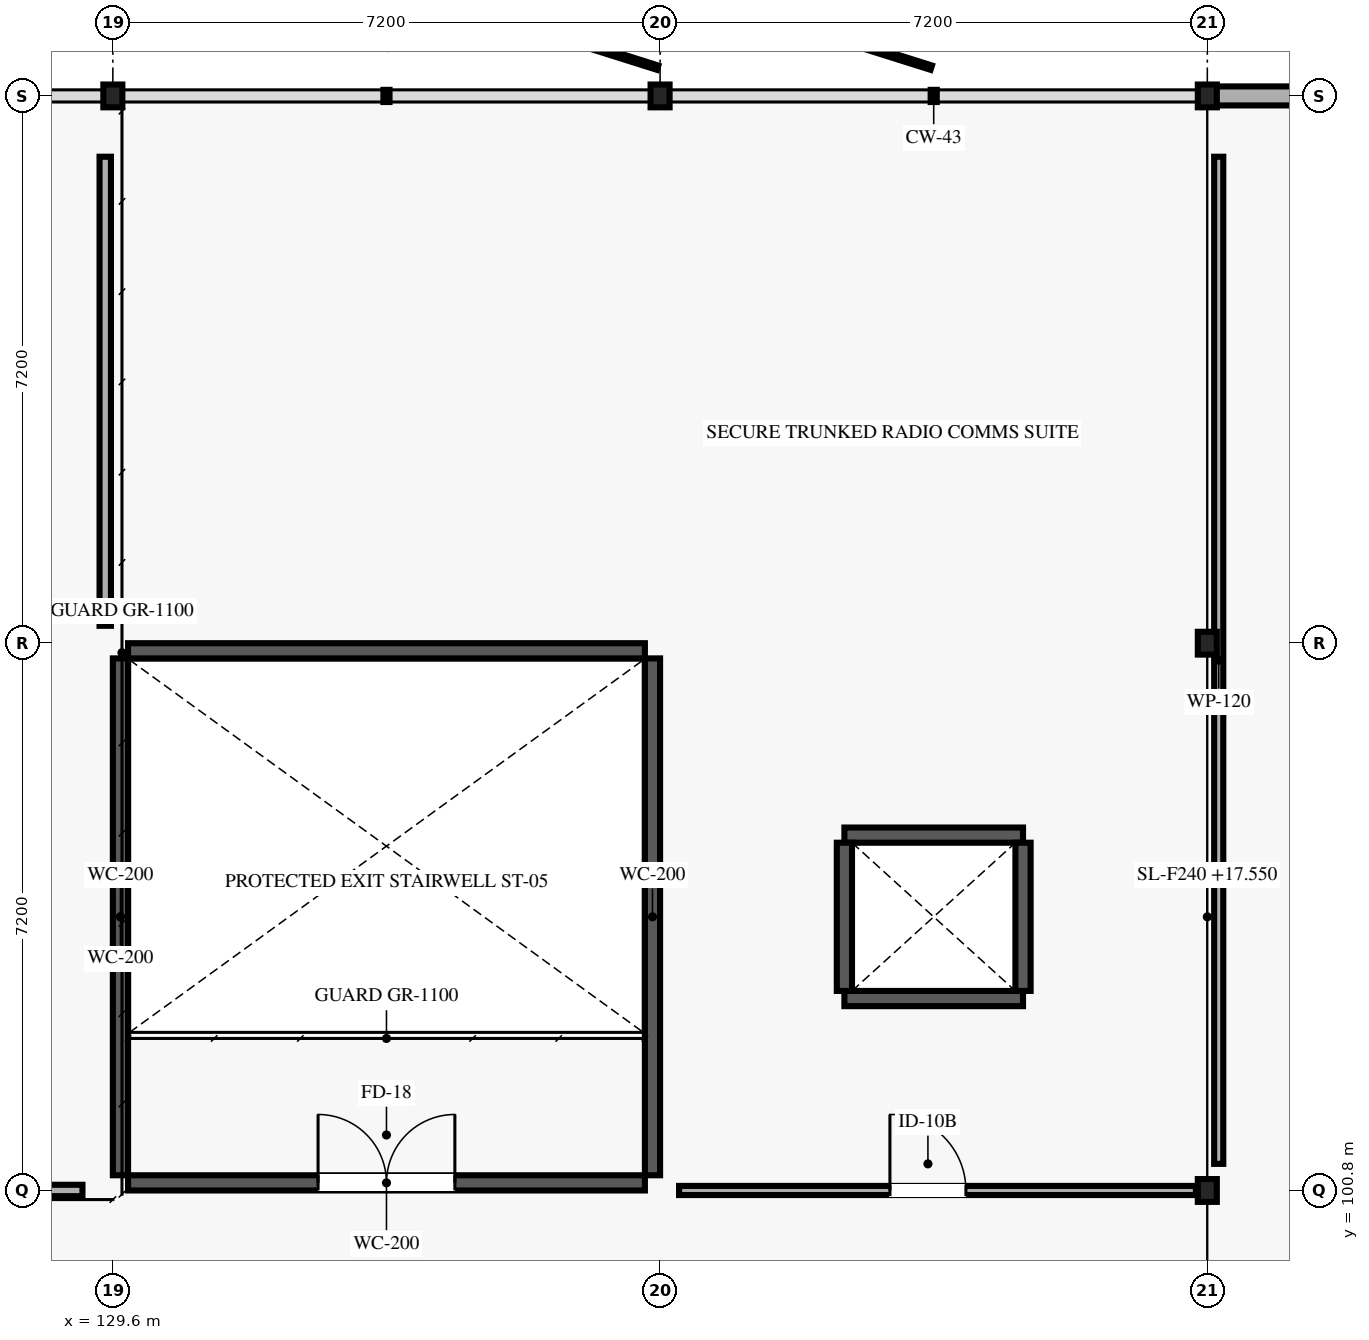
"""IFC4 building model, lengths in metres.
Left out: names, types, materials, properties, quantities, classifications, styles, units other than length and angle.
Written with IfcOpenShell. Run it as: python <this file> out.ifc"""

import sys

from ifc_helpers import new_model, si_unit, direction, frame, frame_2d, origin, origin_2d, place, context, subcontext, project, spatial, rectangle, i_section, extrude, element, fill, save


model = new_model("IFC4")
c1 = context("Model", 3, precision=1e-05, world=origin(), true_north=direction((0.0, 1.0)))
c2 = subcontext(c1, "Body", "Model", "MODEL_VIEW")
j1 = project(units=[si_unit("LENGTHUNIT", "METRE"), si_unit("PLANEANGLEUNIT", "RADIAN")], contexts=[c1])
p1 = place(None, origin())
s1 = spatial("IfcSite", under=j1, at=p1, CompositionType="ELEMENT")
p2 = place(p1, origin())
s2 = spatial("IfcBuilding", under=s1, at=p2, CompositionType="ELEMENT")
p3 = place(p2, frame((0.0, 0.0, 17.55)))
s3 = spatial("IfcBuildingStorey", under=s2, at=p3, CompositionType="ELEMENT", Elevation=17.55)
for number, where, z_axis, x_axis in (
    (1, (129.6, 115.2, 0.0), (0.0, 0.0, 1.0), (1.0, 0.0, 0.0)),
    (2, (136.8, 115.2, 0.0), (0.0, 0.0, 1.0), (1.0, 0.0, 0.0)),
    (3, (144.0, 100.8, 0.0), (0.0, 0.0, 1.0), (1.0, 0.0, 0.0)),
    (4, (144.0, 108.0, 0.0), (0.0, 0.0, 1.0), (1.0, 0.0, 0.0)),
    (5, (144.0, 115.2, 0.0), (0.0, 0.0, 1.0), (1.0, 0.0, 0.0)),
):
    element("IfcColumn", number, at=place(p3, frame(where, z_axis=z_axis, x_axis=x_axis)), inside=s3, PredefinedType="COLUMN", context=c2, shape_type="SweptSolid", body=[
        extrude(i_section(OverallWidth=0.25, OverallDepth=0.3, WebThickness=0.01, FlangeThickness=0.01, at=origin_2d()), origin(), (0.0, 0.0, 1.0), 4.05),
    ])
p4 = place(p3, frame((144.01, 115.2, 0.0), z_axis=(0.0, 0.0, 1.0), x_axis=(1.0, 0.0, 0.0)))
e6 = element("IfcWall", 6, at=p4, inside=s3, PredefinedType="SOLIDWALL", context=c2, shape_type="SweptSolid", body=[
    extrude(rectangle(XDim=6.895, YDim=0.25, at=frame_2d((3.448, 0.0))), origin(), (0.0, 0.0, 1.0), 3.295),
])
p5 = place(p4, frame((2.147, 0.0, 0.85)))
e7 = element("IfcOpeningElement", 7, at=p5, cuts=e6, PredefinedType="OPENING", context=c2, shape_type="SweptSolid", body=[
    extrude(rectangle(XDim=2.6, YDim=1.8, at=frame_2d((1.3, 0.9))), frame((0.0, 0.135, 0.0), z_axis=(0.0, -1.0, 0.0), x_axis=(1.0, 0.0, 0.0)), (0.0, 0.0, 1.0), 0.27),
])
p6 = place(p3, frame((129.8, 100.9, 0.0), z_axis=(0.0, 0.0, 1.0), x_axis=(1.0, 0.0, 0.0)))
e8 = element("IfcWall", 8, at=p6, inside=s3, PredefinedType="SHEAR", context=c2, shape_type="SweptSolid", body=[
    extrude(rectangle(XDim=6.8, YDim=0.2, at=frame_2d((3.4, 0.0))), origin(), (0.0, 0.0, 1.0), 3.83),
])
p7 = place(p6, frame((2.5, 0.0, 0.0)))
e9 = element("IfcOpeningElement", 9, at=p7, cuts=e8, PredefinedType="OPENING", context=c2, shape_type="SweptSolid", body=[
    extrude(rectangle(XDim=1.8, YDim=2.2, at=frame_2d((0.9, 1.1))), frame((0.0, 0.11, 0.0), z_axis=(0.0, -1.0, 0.0), x_axis=(1.0, 0.0, 0.0)), (0.0, 0.0, 1.0), 0.22),
])
for number, where, z_axis, x_axis in (
    (10, (129.8, 107.9, 0.0), (0.0, 0.0, 1.0), (1.0, 0.0, 0.0)),
    (11, (129.7, 101.0, 0.0), (0.0, 0.0, 1.0), (0.0, 1.0, 0.0)),
    (12, (136.7, 101.0, 0.0), (0.0, 0.0, 1.0), (0.0, 1.0, 0.0)),
):
    element("IfcWall", number, at=place(p3, frame(where, z_axis=z_axis, x_axis=x_axis)), inside=s3, PredefinedType="SHEAR", context=c2, shape_type="SweptSolid", body=[
        extrude(rectangle(XDim=6.8, YDim=0.2, at=frame_2d((3.4, 0.0))), origin(), (0.0, 0.0, 1.0), 3.83),
    ])
for number, where, z_axis, x_axis in (
    (13, (139.225, 103.325, 0.0), (0.0, 0.0, 1.0), (1.0, 0.0, 0.0)),
    (14, (139.225, 105.475, 0.0), (0.0, 0.0, 1.0), (1.0, 0.0, 0.0)),
):
    element("IfcWall", number, at=place(p3, frame(where, z_axis=z_axis, x_axis=x_axis)), inside=s3, PredefinedType="SHEAR", context=c2, shape_type="SweptSolid", body=[
        extrude(rectangle(XDim=2.35, YDim=0.2, at=frame_2d((1.175, 0.0))), origin(), (0.0, 0.0, 1.0), 3.83),
    ])
for number, where, z_axis, x_axis in (
    (15, (139.225, 103.425, 0.0), (0.0, 0.0, 1.0), (0.0, 1.0, 0.0)),
    (16, (141.575, 103.425, 0.0), (0.0, 0.0, 1.0), (0.0, 1.0, 0.0)),
):
    element("IfcWall", number, at=place(p3, frame(where, z_axis=z_axis, x_axis=x_axis)), inside=s3, PredefinedType="SHEAR", context=c2, shape_type="SweptSolid", body=[
        extrude(rectangle(XDim=1.95, YDim=0.2, at=frame_2d((0.975, 0.0))), origin(), (0.0, 0.0, 1.0), 3.83),
    ])
p8 = place(p3, frame((129.5, 108.229, 0.0), z_axis=(0.0, 0.0, 1.0), x_axis=(0.0, 1.0, 0.0)))
e17 = element("IfcWall", 17, at=p8, inside=s3, PredefinedType="PARTITIONING", context=c2, shape_type="SweptSolid", body=[
    extrude(rectangle(XDim=6.171, YDim=0.15, at=frame_2d((3.085, 0.0))), origin(), (0.0, 0.0, 1.0), 3.83),
])
p9 = place(p3, frame((94.1, 100.8, 0.0), z_axis=(0.0, 0.0, 1.0), x_axis=(1.0, 0.0, 0.0)))
e18 = element("IfcWall", 18, at=p9, inside=s3, PredefinedType="PARTITIONING", context=c2, shape_type="SweptSolid", body=[
    extrude(rectangle(XDim=35.1, YDim=0.15, at=frame_2d((17.55, 0.0))), origin(), (0.0, 0.0, 1.0), 3.83),
])
p10 = place(p9, frame((23.68, 0.0, 0.0)))
e19 = element("IfcOpeningElement", 19, at=p10, cuts=e18, PredefinedType="OPENING", context=c2, shape_type="SweptSolid", body=[
    extrude(rectangle(XDim=2.1, YDim=2.4, at=frame_2d((1.05, 1.2))), frame((0.0, 0.085, 0.0), z_axis=(0.0, -1.0, 0.0), x_axis=(1.0, 0.0, 0.0)), (0.0, 0.0, 1.0), 0.17),
])
p11 = place(p3, frame((144.15, 101.15, 0.0), z_axis=(0.0, 0.0, 1.0), x_axis=(0.0, 1.0, 0.0)))
e20 = element("IfcWall", 20, at=p11, inside=s3, PredefinedType="PARTITIONING", context=c2, shape_type="SweptSolid", body=[
    extrude(rectangle(XDim=13.25, YDim=0.12, at=frame_2d((6.625, 0.0))), origin(), (0.0, 0.0, 1.0), 3.3),
])
p12 = place(p3, frame((137.05, 100.8, 0.0), z_axis=(0.0, 0.0, 1.0), x_axis=(1.0, 0.0, 0.0)))
e21 = element("IfcWall", 21, at=p12, inside=s3, PredefinedType="PARTITIONING", context=c2, shape_type="SweptSolid", body=[
    extrude(rectangle(XDim=6.8, YDim=0.12, at=frame_2d((3.4, 0.0))), origin(), (0.0, 0.0, 1.0), 3.83),
])
p13 = place(p12, frame((2.774, 0.0, 0.0)))
e22 = element("IfcOpeningElement", 22, at=p13, cuts=e21, PredefinedType="OPENING", context=c2, shape_type="SweptSolid", body=[
    extrude(rectangle(XDim=1.0, YDim=2.1, at=frame_2d((0.5, 1.05))), frame((0.0, 0.07, 0.0), z_axis=(0.0, -1.0, 0.0), x_axis=(1.0, 0.0, 0.0)), (0.0, 0.0, 1.0), 0.14),
])
p14 = place(p7, origin())
e23 = element("IfcDoor", 23, at=p14, inside=s3, OperationType="DOUBLE_DOOR_SINGLE_SWING", PredefinedType="DOOR", context=c2, shape_type="SweptSolid", body=[
    extrude(rectangle(XDim=1.8, YDim=2.2, at=frame_2d((0.9, 1.1))), frame((0.0, 0.025, 0.0), z_axis=(0.0, -1.0, 0.0), x_axis=(1.0, 0.0, 0.0)), (0.0, 0.0, 1.0), 0.05),
])
fill(e9, e23)
p15 = place(p13, origin())
e24 = element("IfcDoor", 24, at=p15, inside=s3, OperationType="SINGLE_SWING_LEFT", PredefinedType="DOOR", context=c2, shape_type="SweptSolid", body=[
    extrude(rectangle(XDim=1.0, YDim=2.1, at=frame_2d((0.5, 1.05))), frame((0.0, 0.025, 0.0), z_axis=(0.0, -1.0, 0.0), x_axis=(1.0, 0.0, 0.0)), (0.0, 0.0, 1.0), 0.05),
])
fill(e22, e24)
save(model, sys.argv[1])
